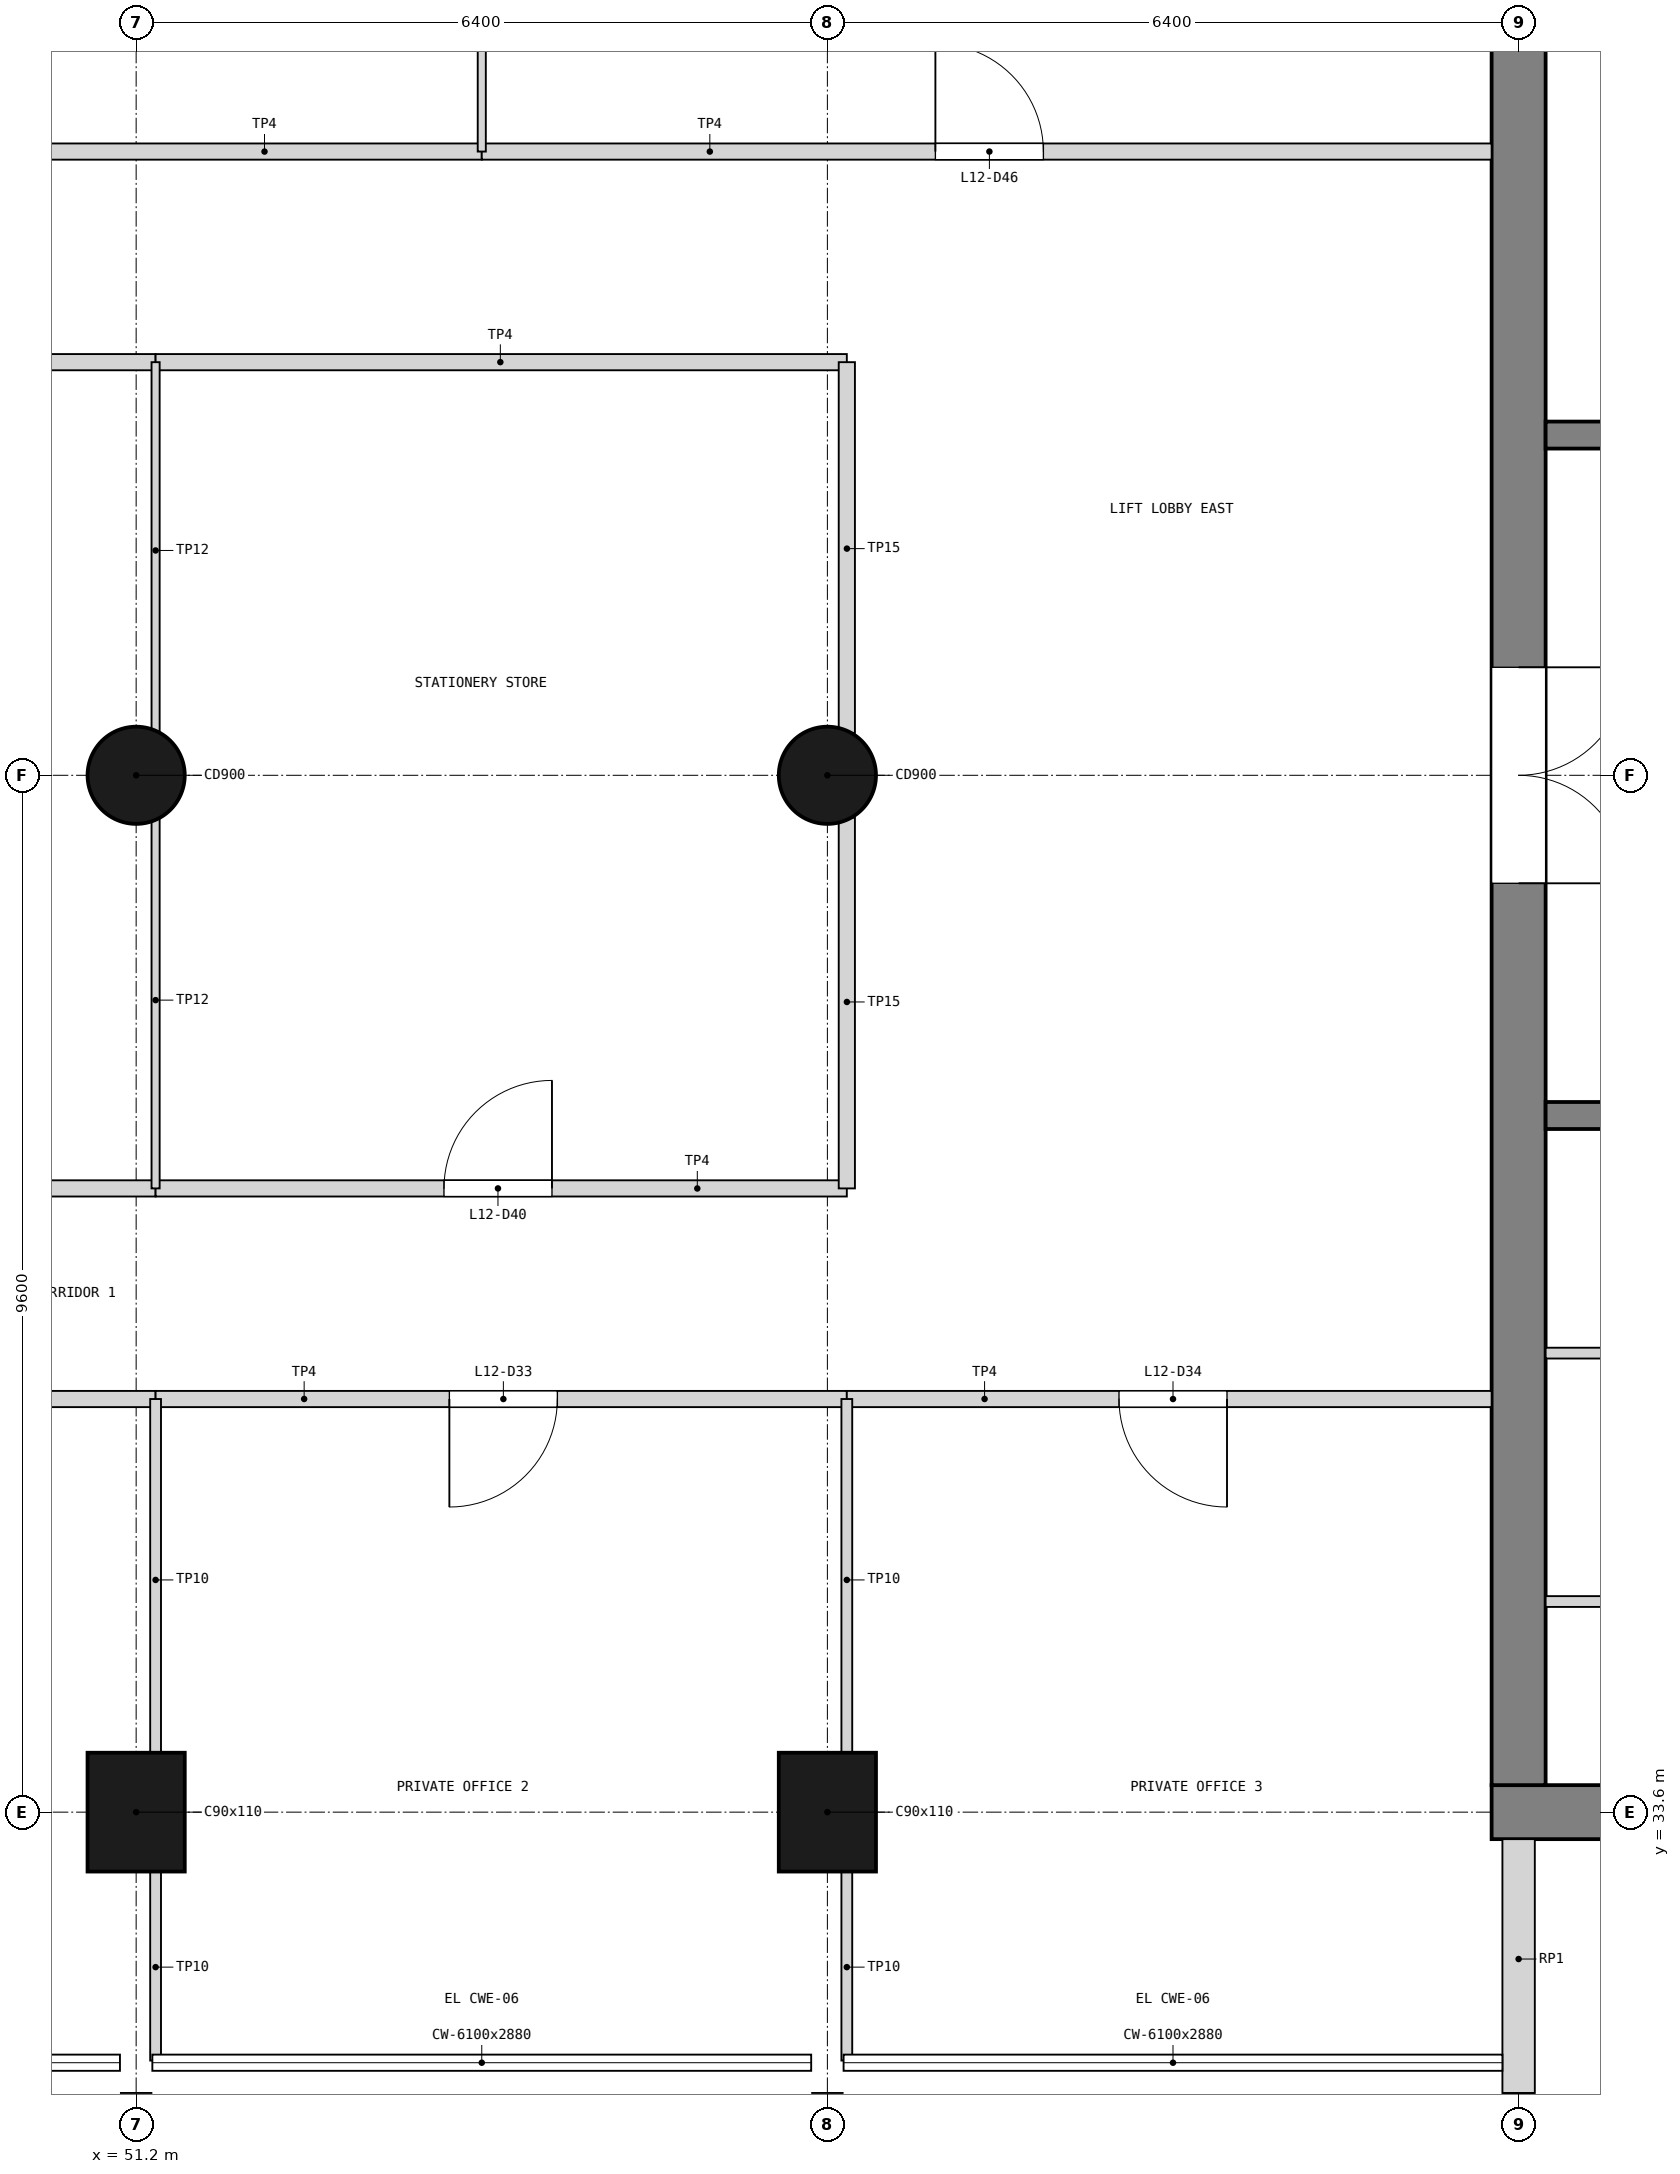
"""IFC4 building model, lengths in metres.
Left out: names, types, materials, properties, quantities, classifications, styles, units other than length and angle.
Written with IfcOpenShell. Run it as: python <this file> out.ifc"""

import sys

from ifc_helpers import new_model, si_unit, direction, frame, frame_2d, origin, origin_2d, place, context, subcontext, project, spatial, rectangle, circle, extrude, element, fill, save


model = new_model("IFC4")
c1 = context("Model", 3, precision=1e-05, world=origin(), true_north=direction((0.0, 1.0)))
c2 = subcontext(c1, "Body", "Model", "MODEL_VIEW")
j1 = project(units=[si_unit("LENGTHUNIT", "METRE"), si_unit("PLANEANGLEUNIT", "RADIAN")], contexts=[c1])
p1 = place(None, origin())
s1 = spatial("IfcSite", under=j1, at=p1, CompositionType="ELEMENT")
p2 = place(p1, origin())
s2 = spatial("IfcBuilding", under=s1, at=p2, CompositionType="ELEMENT")
p3 = place(p2, frame((0.0, 0.0, 48.3)))
s3 = spatial("IfcBuildingStorey", under=s2, at=p3, CompositionType="ELEMENT", Elevation=48.3)
p4 = place(p3, frame((63.75, 33.6, 0.0), z_axis=(0.0, 0.0, 1.0), x_axis=(1.0, 0.0, 0.0)))
e1 = element("IfcWall", 1, at=p4, inside=s3, PredefinedType="SHEAR", context=c2, shape_type="SweptSolid", body=[
    extrude(rectangle(XDim=13.3, YDim=0.5, at=frame_2d((6.65, 0.0))), origin(), (0.0, 0.0, 1.0), 3.9),
])
p5 = place(p4, frame((11.05, 0.0, 1.0)))
e2 = element("IfcOpeningElement", 2, at=p5, cuts=e1, PredefinedType="OPENING", context=c2, shape_type="SweptSolid", body=[
    extrude(rectangle(XDim=0.4, YDim=2.0, at=frame_2d((0.2, 1.0))), frame((0.0, 0.26, 0.0), z_axis=(0.0, -1.0, 0.0), x_axis=(1.0, 0.0, 0.0)), (0.0, 0.0, 1.0), 0.52),
])
p6 = place(p3, frame((64.0, 33.85, 0.0), z_axis=(0.0, 0.0, 1.0), x_axis=(0.0, 1.0, 0.0)))
e3 = element("IfcWall", 3, at=p6, inside=s3, PredefinedType="SHEAR", context=c2, shape_type="SweptSolid", body=[
    extrude(rectangle(XDim=18.7, YDim=0.5, at=frame_2d((9.35, 0.0))), origin(), (0.0, 0.0, 1.0), 3.9),
])
p7 = place(p6, frame((8.35, 0.0, 0.0)))
e4 = element("IfcOpeningElement", 4, at=p7, cuts=e3, PredefinedType="OPENING", context=c2, shape_type="SweptSolid", body=[
    extrude(rectangle(XDim=2.0, YDim=2.1, at=frame_2d((1.0, 1.05))), frame((0.0, 0.26, 0.0), z_axis=(0.0, -1.0, 0.0), x_axis=(1.0, 0.0, 0.0)), (0.0, 0.0, 1.0), 0.52),
])
p8 = place(p3, frame((51.2, 33.6, 0.0), z_axis=(0.0, 0.0, 1.0), x_axis=(1.0, 0.0, 0.0)))
e5 = element("IfcColumn", 5, at=p8, inside=s3, PredefinedType="COLUMN", context=c2, shape_type="SweptSolid", body=[
    extrude(rectangle(XDim=0.9, YDim=1.1, at=origin_2d()), origin(), (0.0, 0.0, 1.0), 3.9),
])
p9 = place(p3, frame((51.2, 43.2, 0.0), z_axis=(0.0, 0.0, 1.0), x_axis=(1.0, 0.0, 0.0)))
e6 = element("IfcColumn", 6, at=p9, inside=s3, PredefinedType="COLUMN", context=c2, shape_type="SweptSolid", body=[
    extrude(circle(Radius=0.45, at=origin_2d()), origin(), (0.0, 0.0, 1.0), 3.9),
])
p10 = place(p3, frame((57.6, 33.6, 0.0), z_axis=(0.0, 0.0, 1.0), x_axis=(1.0, 0.0, 0.0)))
e7 = element("IfcColumn", 7, at=p10, inside=s3, PredefinedType="COLUMN", context=c2, shape_type="SweptSolid", body=[
    extrude(rectangle(XDim=0.9, YDim=1.1, at=origin_2d()), origin(), (0.0, 0.0, 1.0), 3.9),
])
p11 = place(p3, frame((57.6, 43.2, 0.0), z_axis=(0.0, 0.0, 1.0), x_axis=(1.0, 0.0, 0.0)))
e8 = element("IfcColumn", 8, at=p11, inside=s3, PredefinedType="COLUMN", context=c2, shape_type="SweptSolid", body=[
    extrude(circle(Radius=0.45, at=origin_2d()), origin(), (0.0, 0.0, 1.0), 3.9),
])
p12 = place(p3, frame((64.0, 31.0, 0.0), z_axis=(0.0, 0.0, 1.0), x_axis=(0.0, 1.0, 0.0)))
e9 = element("IfcWall", 9, at=p12, inside=s3, PredefinedType="SOLIDWALL", context=c2, shape_type="SweptSolid", body=[
    extrude(rectangle(XDim=2.35, YDim=0.3, at=frame_2d((1.175, 0.0))), origin(), (0.0, 0.0, 1.0), 2.88),
])
for number, where, z_axis, x_axis in (
    (10, (69.725, 40.05, 0.0), (0.0, 0.0, 1.0), (-1.0, 0.0, 0.0)),
    (11, (69.725, 46.35, 0.0), (0.0, 0.0, 1.0), (-1.0, 0.0, 0.0)),
):
    element("IfcWall", number, at=place(p3, frame(where, z_axis=z_axis, x_axis=x_axis)), inside=s3, PredefinedType="SOLIDWALL", context=c2, shape_type="SweptSolid", body=[
        extrude(rectangle(XDim=5.475, YDim=0.25, at=frame_2d((2.738, 0.0))), origin(), (0.0, 0.0, 1.0), 3.6),
    ])
p13 = place(p3, frame((69.475, 35.55, 0.0), z_axis=(0.0, 0.0, 1.0), x_axis=(-1.0, 0.0, 0.0)))
e12 = element("IfcWall", 12, at=p13, inside=s3, PredefinedType="PARTITIONING", context=c2, shape_type="SweptSolid", body=[
    extrude(rectangle(XDim=5.225, YDim=0.1, at=frame_2d((2.613, 0.0))), origin(), (0.0, 0.0, 1.0), 3.6),
])
p14 = place(p3, frame((67.925, 37.85, 0.0), z_axis=(0.0, 0.0, 1.0), x_axis=(-1.0, 0.0, 0.0)))
e13 = element("IfcWall", 13, at=p14, inside=s3, PredefinedType="PARTITIONING", context=c2, shape_type="SweptSolid", body=[
    extrude(rectangle(XDim=3.675, YDim=0.1, at=frame_2d((1.837, 0.0))), origin(), (0.0, 0.0, 1.0), 3.6),
])
p15 = place(p3, frame((44.62, 37.425, 0.0), z_axis=(0.0, 0.0, 1.0), x_axis=(1.0, 0.0, 0.0)))
e14 = element("IfcWall", 14, at=p15, inside=s3, PredefinedType="PARTITIONING", context=c2, shape_type="SweptSolid", body=[
    extrude(rectangle(XDim=6.76, YDim=0.15, at=frame_2d((3.38, 0.0))), origin(), (0.0, 0.0, 1.0), 3.68),
])
p16 = place(p15, frame((2.48, 0.0, 0.0)))
e15 = element("IfcOpeningElement", 15, at=p16, cuts=e14, PredefinedType="OPENING", context=c2, shape_type="SweptSolid", body=[
    extrude(rectangle(XDim=1.8, YDim=2.1, at=frame_2d((0.9, 1.05))), frame((0.0, 0.085, 0.0), z_axis=(0.0, -1.0, 0.0), x_axis=(1.0, 0.0, 0.0)), (0.0, 0.0, 1.0), 0.17),
])
p17 = place(p3, frame((51.38, 37.425, 0.0), z_axis=(0.0, 0.0, 1.0), x_axis=(1.0, 0.0, 0.0)))
e16 = element("IfcWall", 16, at=p17, inside=s3, PredefinedType="PARTITIONING", context=c2, shape_type="SweptSolid", body=[
    extrude(rectangle(XDim=6.4, YDim=0.15, at=frame_2d((3.2, 0.0))), origin(), (0.0, 0.0, 1.0), 3.68),
])
p18 = place(p17, frame((2.72, 0.0, 0.0)))
e17 = element("IfcOpeningElement", 17, at=p18, cuts=e16, PredefinedType="OPENING", context=c2, shape_type="SweptSolid", body=[
    extrude(rectangle(XDim=1.0, YDim=2.1, at=frame_2d((0.5, 1.05))), frame((0.0, 0.085, 0.0), z_axis=(0.0, -1.0, 0.0), x_axis=(1.0, 0.0, 0.0)), (0.0, 0.0, 1.0), 0.17),
])
p19 = place(p3, frame((57.78, 37.425, 0.0), z_axis=(0.0, 0.0, 1.0), x_axis=(1.0, 0.0, 0.0)))
e18 = element("IfcWall", 18, at=p19, inside=s3, PredefinedType="PARTITIONING", context=c2, shape_type="SweptSolid", body=[
    extrude(rectangle(XDim=5.97, YDim=0.15, at=frame_2d((2.985, 0.0))), origin(), (0.0, 0.0, 1.0), 3.68),
])
p20 = place(p19, frame((2.52, 0.0, 0.0)))
e19 = element("IfcOpeningElement", 19, at=p20, cuts=e18, PredefinedType="OPENING", context=c2, shape_type="SweptSolid", body=[
    extrude(rectangle(XDim=1.0, YDim=2.1, at=frame_2d((0.5, 1.05))), frame((0.0, 0.085, 0.0), z_axis=(0.0, -1.0, 0.0), x_axis=(1.0, 0.0, 0.0)), (0.0, 0.0, 1.0), 0.17),
])
p21 = place(p3, frame((51.38, 31.3, 0.0), z_axis=(0.0, 0.0, 1.0), x_axis=(0.0, 1.0, 0.0)))
e20 = element("IfcWall", 20, at=p21, inside=s3, PredefinedType="PARTITIONING", context=c2, shape_type="SweptSolid", body=[
    extrude(rectangle(XDim=1.77, YDim=0.1, at=frame_2d((0.885, 0.0))), origin(), (0.0, 0.0, 1.0), 2.78),
])
p22 = place(p3, frame((51.38, 34.13, 0.0), z_axis=(0.0, 0.0, 1.0), x_axis=(0.0, 1.0, 0.0)))
e21 = element("IfcWall", 21, at=p22, inside=s3, PredefinedType="PARTITIONING", context=c2, shape_type="SweptSolid", body=[
    extrude(rectangle(XDim=3.295, YDim=0.1, at=frame_2d((1.647, 0.0))), origin(), (0.0, 0.0, 1.0), 2.78),
])
p23 = place(p3, frame((57.78, 31.3, 0.0), z_axis=(0.0, 0.0, 1.0), x_axis=(0.0, 1.0, 0.0)))
e22 = element("IfcWall", 22, at=p23, inside=s3, PredefinedType="PARTITIONING", context=c2, shape_type="SweptSolid", body=[
    extrude(rectangle(XDim=1.77, YDim=0.1, at=frame_2d((0.885, 0.0))), origin(), (0.0, 0.0, 1.0), 2.78),
])
p24 = place(p3, frame((57.78, 34.13, 0.0), z_axis=(0.0, 0.0, 1.0), x_axis=(0.0, 1.0, 0.0)))
e23 = element("IfcWall", 23, at=p24, inside=s3, PredefinedType="PARTITIONING", context=c2, shape_type="SweptSolid", body=[
    extrude(rectangle(XDim=3.295, YDim=0.1, at=frame_2d((1.647, 0.0))), origin(), (0.0, 0.0, 1.0), 2.78),
])
p25 = place(p3, frame((44.62, 39.375, 0.0), z_axis=(0.0, 0.0, 1.0), x_axis=(1.0, 0.0, 0.0)))
e24 = element("IfcWall", 24, at=p25, inside=s3, PredefinedType="PARTITIONING", context=c2, shape_type="SweptSolid", body=[
    extrude(rectangle(XDim=6.76, YDim=0.15, at=frame_2d((3.38, 0.0))), origin(), (0.0, 0.0, 1.0), 3.68),
])
p26 = place(p25, frame((2.88, 0.0, 0.0)))
e25 = element("IfcOpeningElement", 25, at=p26, cuts=e24, PredefinedType="OPENING", context=c2, shape_type="SweptSolid", body=[
    extrude(rectangle(XDim=1.0, YDim=2.1, at=frame_2d((0.5, 1.05))), frame((0.0, 0.085, 0.0), z_axis=(0.0, -1.0, 0.0), x_axis=(1.0, 0.0, 0.0)), (0.0, 0.0, 1.0), 0.17),
])
p27 = place(p3, frame((44.62, 47.025, 0.0), z_axis=(0.0, 0.0, 1.0), x_axis=(1.0, 0.0, 0.0)))
e26 = element("IfcWall", 26, at=p27, inside=s3, PredefinedType="PARTITIONING", context=c2, shape_type="SweptSolid", body=[
    extrude(rectangle(XDim=6.76, YDim=0.15, at=frame_2d((3.38, 0.0))), origin(), (0.0, 0.0, 1.0), 3.68),
])
p28 = place(p3, frame((51.38, 39.375, 0.0), z_axis=(0.0, 0.0, 1.0), x_axis=(1.0, 0.0, 0.0)))
e27 = element("IfcWall", 27, at=p28, inside=s3, PredefinedType="PARTITIONING", context=c2, shape_type="SweptSolid", body=[
    extrude(rectangle(XDim=6.4, YDim=0.15, at=frame_2d((3.2, 0.0))), origin(), (0.0, 0.0, 1.0), 3.68),
])
p29 = place(p28, frame((2.67, 0.0, 0.0)))
e28 = element("IfcOpeningElement", 28, at=p29, cuts=e27, PredefinedType="OPENING", context=c2, shape_type="SweptSolid", body=[
    extrude(rectangle(XDim=1.0, YDim=2.1, at=frame_2d((0.5, 1.05))), frame((0.0, 0.085, 0.0), z_axis=(0.0, -1.0, 0.0), x_axis=(1.0, 0.0, 0.0)), (0.0, 0.0, 1.0), 0.17),
])
p30 = place(p3, frame((51.38, 47.025, 0.0), z_axis=(0.0, 0.0, 1.0), x_axis=(1.0, 0.0, 0.0)))
e29 = element("IfcWall", 29, at=p30, inside=s3, PredefinedType="PARTITIONING", context=c2, shape_type="SweptSolid", body=[
    extrude(rectangle(XDim=6.4, YDim=0.15, at=frame_2d((3.2, 0.0))), origin(), (0.0, 0.0, 1.0), 3.68),
])
for number, where, z_axis, x_axis in (
    (30, (51.38, 39.375, 0.0), (0.0, 0.0, 1.0), (0.0, 1.0, 0.0)),
    (31, (51.38, 43.592, 0.0), (0.0, 0.0, 1.0), (0.0, 1.0, 0.0)),
):
    element("IfcWall", number, at=place(p3, frame(where, z_axis=z_axis, x_axis=x_axis)), inside=s3, PredefinedType="PARTITIONING", context=c2, shape_type="SweptSolid", body=[
        extrude(rectangle(XDim=3.433, YDim=0.075, at=frame_2d((1.716, 0.0))), origin(), (0.0, 0.0, 1.0), 2.78),
    ])
p31 = place(p3, frame((44.62, 48.975, 0.0), z_axis=(0.0, 0.0, 1.0), x_axis=(1.0, 0.0, 0.0)))
e32 = element("IfcWall", 32, at=p31, inside=s3, PredefinedType="PARTITIONING", context=c2, shape_type="SweptSolid", body=[
    extrude(rectangle(XDim=9.78, YDim=0.15, at=frame_2d((4.89, 0.0))), origin(), (0.0, 0.0, 1.0), 3.68),
])
p32 = place(p31, frame((3.98, 0.0, 0.0)))
e33 = element("IfcOpeningElement", 33, at=p32, cuts=e32, PredefinedType="OPENING", context=c2, shape_type="SweptSolid", body=[
    extrude(rectangle(XDim=1.8, YDim=2.1, at=frame_2d((0.9, 1.05))), frame((0.0, 0.085, 0.0), z_axis=(0.0, -1.0, 0.0), x_axis=(1.0, 0.0, 0.0)), (0.0, 0.0, 1.0), 0.17),
])
p33 = place(p3, frame((54.4, 48.975, 0.0), z_axis=(0.0, 0.0, 1.0), x_axis=(1.0, 0.0, 0.0)))
e34 = element("IfcWall", 34, at=p33, inside=s3, PredefinedType="PARTITIONING", context=c2, shape_type="SweptSolid", body=[
    extrude(rectangle(XDim=9.35, YDim=0.15, at=frame_2d((4.675, 0.0))), origin(), (0.0, 0.0, 1.0), 3.68),
])
p34 = place(p33, frame((4.2, 0.0, 0.0)))
e35 = element("IfcOpeningElement", 35, at=p34, cuts=e34, PredefinedType="OPENING", context=c2, shape_type="SweptSolid", body=[
    extrude(rectangle(XDim=1.0, YDim=2.1, at=frame_2d((0.5, 1.05))), frame((0.0, 0.085, 0.0), z_axis=(0.0, -1.0, 0.0), x_axis=(1.0, 0.0, 0.0)), (0.0, 0.0, 1.0), 0.17),
])
p35 = place(p3, frame((54.4, 48.975, 0.0), z_axis=(0.0, 0.0, 1.0), x_axis=(0.0, 1.0, 0.0)))
e36 = element("IfcWall", 36, at=p35, inside=s3, PredefinedType="PARTITIONING", context=c2, shape_type="SweptSolid", body=[
    extrude(rectangle(XDim=6.125, YDim=0.075, at=frame_2d((3.062, 0.0))), origin(), (0.0, 0.0, 1.0), 3.08),
])
for number, where, z_axis, x_axis in (
    (37, (57.78, 39.375, 0.0), (0.0, 0.0, 1.0), (0.0, 1.0, 0.0)),
    (38, (57.78, 43.592, 0.0), (0.0, 0.0, 1.0), (0.0, 1.0, 0.0)),
):
    element("IfcWall", number, at=place(p3, frame(where, z_axis=z_axis, x_axis=x_axis)), inside=s3, PredefinedType="PARTITIONING", context=c2, shape_type="SweptSolid", body=[
        extrude(rectangle(XDim=3.433, YDim=0.15, at=frame_2d((1.716, 0.0))), origin(), (0.0, 0.0, 1.0), 2.78),
    ])
p36 = place(p7, frame((2.0, 0.0, 0.0), z_axis=(0.0, 0.0, 1.0), x_axis=(-1.0, 0.0, 0.0)))
e39 = element("IfcDoor", 39, at=p36, inside=s3, OperationType="DOUBLE_DOOR_SINGLE_SWING", PredefinedType="DOOR", context=c2, shape_type="SweptSolid", body=[
    extrude(rectangle(XDim=2.0, YDim=2.1, at=frame_2d((1.0, 1.05))), frame((0.0, 0.025, 0.0), z_axis=(0.0, -1.0, 0.0), x_axis=(1.0, 0.0, 0.0)), (0.0, 0.0, 1.0), 0.05),
])
fill(e4, e39)
p37 = place(p18, frame((1.0, 0.0, 0.0), z_axis=(0.0, 0.0, 1.0), x_axis=(-1.0, 0.0, 0.0)))
e40 = element("IfcDoor", 40, at=p37, inside=s3, OperationType="SINGLE_SWING_RIGHT", PredefinedType="DOOR", context=c2, shape_type="SweptSolid", body=[
    extrude(rectangle(XDim=1.0, YDim=2.1, at=frame_2d((0.5, 1.05))), frame((0.0, 0.025, 0.0), z_axis=(0.0, -1.0, 0.0), x_axis=(1.0, 0.0, 0.0)), (0.0, 0.0, 1.0), 0.05),
])
fill(e17, e40)
p38 = place(p20, frame((1.0, 0.0, 0.0), z_axis=(0.0, 0.0, 1.0), x_axis=(-1.0, 0.0, 0.0)))
e41 = element("IfcDoor", 41, at=p38, inside=s3, OperationType="SINGLE_SWING_LEFT", PredefinedType="DOOR", context=c2, shape_type="SweptSolid", body=[
    extrude(rectangle(XDim=1.0, YDim=2.1, at=frame_2d((0.5, 1.05))), frame((0.0, 0.025, 0.0), z_axis=(0.0, -1.0, 0.0), x_axis=(1.0, 0.0, 0.0)), (0.0, 0.0, 1.0), 0.05),
])
fill(e19, e41)
p39 = place(p29, origin())
e42 = element("IfcDoor", 42, at=p39, inside=s3, OperationType="SINGLE_SWING_RIGHT", PredefinedType="DOOR", context=c2, shape_type="SweptSolid", body=[
    extrude(rectangle(XDim=1.0, YDim=2.1, at=frame_2d((0.5, 1.05))), frame((0.0, 0.025, 0.0), z_axis=(0.0, -1.0, 0.0), x_axis=(1.0, 0.0, 0.0)), (0.0, 0.0, 1.0), 0.05),
])
fill(e28, e42)
p40 = place(p34, origin())
e43 = element("IfcDoor", 43, at=p40, inside=s3, OperationType="SINGLE_SWING_LEFT", PredefinedType="DOOR", context=c2, shape_type="SweptSolid", body=[
    extrude(rectangle(XDim=1.0, YDim=2.1, at=frame_2d((0.5, 1.05))), frame((0.0, 0.025, 0.0), z_axis=(0.0, -1.0, 0.0), x_axis=(1.0, 0.0, 0.0)), (0.0, 0.0, 1.0), 0.05),
])
fill(e35, e43)
save(model, sys.argv[1])
